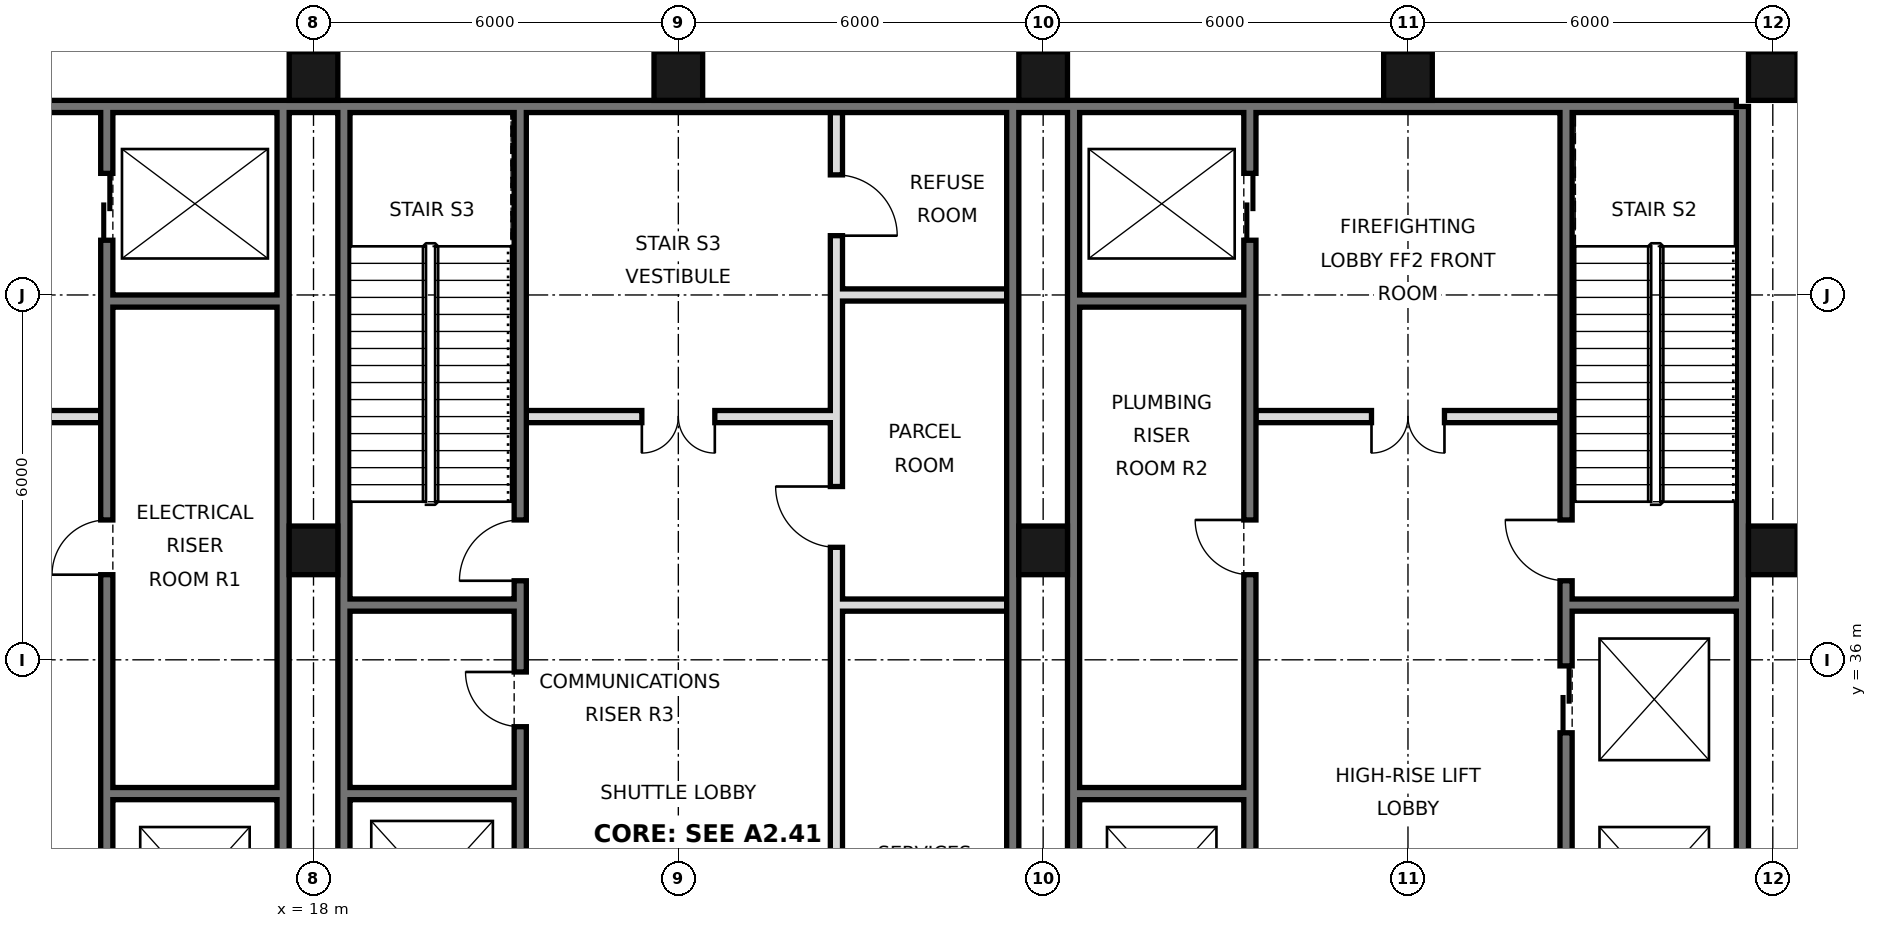
"""IFC4 building model, lengths in metres.
Left out: names, types, materials, properties, quantities, classifications, styles, units other than length and angle.
Written with IfcOpenShell. Run it as: python <this file> out.ifc"""

import sys

from ifc_helpers import new_model, si_unit, direction, frame, frame_2d, origin, origin_2d, place, context, subcontext, project, spatial, rectangle, hollow_rectangle, extrude, element, fill, save


model = new_model("IFC4")
c1 = context("Model", 3, precision=1e-05, world=origin(), true_north=direction((0.0, 1.0)))
c2 = subcontext(c1, "Body", "Model", "MODEL_VIEW")
j1 = project(units=[si_unit("LENGTHUNIT", "METRE"), si_unit("PLANEANGLEUNIT", "RADIAN")], contexts=[c1])
p1 = place(None, origin())
s1 = spatial("IfcSite", under=j1, at=p1, CompositionType="ELEMENT")
p2 = place(p1, origin())
s2 = spatial("IfcBuilding", under=s1, at=p2, CompositionType="ELEMENT")
p3 = place(p2, frame((0.0, 0.0, 161.8)))
s3 = spatial("IfcBuildingStorey", under=s2, at=p3, CompositionType="ELEMENT", Elevation=161.8)
for number, where, z_axis, x_axis in (
    (1, (18.0, 37.8, 0.0), (0.0, 0.0, 1.0), (1.0, 0.0, 0.0)),
    (2, (18.0, 45.6, 0.0), (0.0, 0.0, 1.0), (1.0, 0.0, 0.0)),
    (3, (24.0, 45.6, 0.0), (0.0, 0.0, 1.0), (1.0, 0.0, 0.0)),
    (4, (30.0, 37.8, 0.0), (0.0, 0.0, 1.0), (1.0, 0.0, 0.0)),
    (5, (30.0, 45.6, 0.0), (0.0, 0.0, 1.0), (1.0, 0.0, 0.0)),
    (6, (36.0, 45.6, 0.0), (0.0, 0.0, 1.0), (1.0, 0.0, 0.0)),
    (7, (42.0, 37.8, 0.0), (0.0, 0.0, 1.0), (1.0, 0.0, 0.0)),
    (8, (42.0, 45.6, 0.0), (0.0, 0.0, 1.0), (1.0, 0.0, 0.0)),
):
    element("IfcColumn", number, at=place(p3, frame(where, z_axis=z_axis, x_axis=x_axis)), inside=s3, PredefinedType="COLUMN", context=c2, shape_type="SweptSolid", body=[
        extrude(hollow_rectangle(XDim=0.8, YDim=0.8, WallThickness=0.045, at=origin_2d()), origin(), (0.0, 0.0, 1.0), 5.4),
    ])
p4 = place(p3, frame((41.5, 21.6, 0.0), z_axis=(0.0, 0.0, 1.0), x_axis=(0.0, 1.0, 0.0)))
e9 = element("IfcWall", 9, at=p4, inside=s3, PredefinedType="SOLIDWALL", context=c2, shape_type="SweptSolid", body=[
    extrude(rectangle(XDim=23.5, YDim=0.2, at=frame_2d((11.75, 0.0))), origin(), (0.0, 0.0, 1.0), 5.22),
])
p5 = place(p3, frame((6.6, 45.1, 0.0), z_axis=(0.0, 0.0, 1.0), x_axis=(1.0, 0.0, 0.0)))
e10 = element("IfcWall", 10, at=p5, inside=s3, PredefinedType="SOLIDWALL", context=c2, shape_type="SweptSolid", body=[
    extrude(rectangle(XDim=34.8, YDim=0.2, at=frame_2d((17.4, 0.0))), origin(), (0.0, 0.0, 1.0), 5.22),
])
for number, where, z_axis, x_axis in (
    (11, (17.5, 27.6, 0.0), (0.0, 0.0, 1.0), (0.0, 1.0, 0.0)),
    (12, (18.5, 27.6, 0.0), (0.0, 0.0, 1.0), (0.0, 1.0, 0.0)),
    (13, (29.5, 27.6, 0.0), (0.0, 0.0, 1.0), (0.0, 1.0, 0.0)),
    (14, (30.5, 27.6, 0.0), (0.0, 0.0, 1.0), (0.0, 1.0, 0.0)),
):
    element("IfcWall", number, at=place(p3, frame(where, z_axis=z_axis, x_axis=x_axis)), inside=s3, PredefinedType="SOLIDWALL", context=c2, shape_type="SweptSolid", body=[
        extrude(rectangle(XDim=17.5, YDim=0.2, at=frame_2d((8.75, 0.0))), origin(), (0.0, 0.0, 1.0), 5.22),
    ])
p6 = place(p3, frame((14.6, 27.5, 0.0), z_axis=(0.0, 0.0, 1.0), x_axis=(0.0, 1.0, 0.0)))
e15 = element("IfcWall", 15, at=p6, inside=s3, PredefinedType="SOLIDWALL", context=c2, shape_type="SweptSolid", body=[
    extrude(rectangle(XDim=17.5, YDim=0.2, at=frame_2d((8.75, 0.0))), origin(), (0.0, 0.0, 1.0), 5.22),
])
p7 = place(p6, frame((1.1, 0.0, 0.0)))
e16 = element("IfcOpeningElement", 16, at=p7, cuts=e15, PredefinedType="OPENING", context=c2, shape_type="SweptSolid", body=[
    extrude(rectangle(XDim=1.1, YDim=2.1, at=frame_2d((0.55, 1.05))), frame((0.0, 0.11, 0.0), z_axis=(0.0, -1.0, 0.0), x_axis=(1.0, 0.0, 0.0)), (0.0, 0.0, 1.0), 0.22),
])
p8 = place(p6, frame((4.2, 0.0, 0.0)))
e17 = element("IfcOpeningElement", 17, at=p8, cuts=e15, PredefinedType="OPENING", context=c2, shape_type="SweptSolid", body=[
    extrude(rectangle(XDim=1.1, YDim=2.1, at=frame_2d((0.55, 1.05))), frame((0.0, 0.11, 0.0), z_axis=(0.0, -1.0, 0.0), x_axis=(1.0, 0.0, 0.0)), (0.0, 0.0, 1.0), 0.22),
])
p9 = place(p6, frame((15.4, 0.0, 0.0)))
e18 = element("IfcOpeningElement", 18, at=p9, cuts=e15, PredefinedType="OPENING", context=c2, shape_type="SweptSolid", body=[
    extrude(rectangle(XDim=1.1, YDim=2.1, at=frame_2d((0.55, 1.05))), frame((0.0, 0.11, 0.0), z_axis=(0.0, -1.0, 0.0), x_axis=(1.0, 0.0, 0.0)), (0.0, 0.0, 1.0), 0.22),
])
p10 = place(p6, frame((9.9, 0.0, 0.0)))
e19 = element("IfcOpeningElement", 19, at=p10, cuts=e15, PredefinedType="OPENING", context=c2, shape_type="SweptSolid", body=[
    extrude(rectangle(XDim=0.9, YDim=2.1, at=frame_2d((0.45, 1.05))), frame((0.0, 0.11, 0.0), z_axis=(0.0, -1.0, 0.0), x_axis=(1.0, 0.0, 0.0)), (0.0, 0.0, 1.0), 0.22),
])
p11 = place(p3, frame((21.4, 27.5, 0.0), z_axis=(0.0, 0.0, 1.0), x_axis=(0.0, 1.0, 0.0)))
e20 = element("IfcWall", 20, at=p11, inside=s3, PredefinedType="SOLIDWALL", context=c2, shape_type="SweptSolid", body=[
    extrude(rectangle(XDim=17.5, YDim=0.2, at=frame_2d((8.75, 0.0))), origin(), (0.0, 0.0, 1.0), 5.22),
])
p12 = place(p11, frame((1.1, 0.0, 0.0)))
e21 = element("IfcOpeningElement", 21, at=p12, cuts=e20, PredefinedType="OPENING", context=c2, shape_type="SweptSolid", body=[
    extrude(rectangle(XDim=1.1, YDim=2.1, at=frame_2d((0.55, 1.05))), frame((0.0, 0.11, 0.0), z_axis=(0.0, -1.0, 0.0), x_axis=(1.0, 0.0, 0.0)), (0.0, 0.0, 1.0), 0.22),
])
p13 = place(p11, frame((4.2, 0.0, 0.0)))
e22 = element("IfcOpeningElement", 22, at=p13, cuts=e20, PredefinedType="OPENING", context=c2, shape_type="SweptSolid", body=[
    extrude(rectangle(XDim=1.1, YDim=2.1, at=frame_2d((0.55, 1.05))), frame((0.0, 0.11, 0.0), z_axis=(0.0, -1.0, 0.0), x_axis=(1.0, 0.0, 0.0)), (0.0, 0.0, 1.0), 0.22),
])
p14 = place(p11, frame((9.8, 0.0, 0.0)))
e23 = element("IfcOpeningElement", 23, at=p14, cuts=e20, PredefinedType="OPENING", context=c2, shape_type="SweptSolid", body=[
    extrude(rectangle(XDim=1.0, YDim=2.1, at=frame_2d((0.5, 1.05))), frame((0.0, 0.11, 0.0), z_axis=(0.0, -1.0, 0.0), x_axis=(1.0, 0.0, 0.0)), (0.0, 0.0, 1.0), 0.22),
])
p15 = place(p11, frame((7.4, 0.0, 0.0)))
e24 = element("IfcOpeningElement", 24, at=p15, cuts=e20, PredefinedType="OPENING", context=c2, shape_type="SweptSolid", body=[
    extrude(rectangle(XDim=0.9, YDim=2.1, at=frame_2d((0.45, 1.05))), frame((0.0, 0.11, 0.0), z_axis=(0.0, -1.0, 0.0), x_axis=(1.0, 0.0, 0.0)), (0.0, 0.0, 1.0), 0.22),
])
p16 = place(p3, frame((26.6, 27.5, 0.0), z_axis=(0.0, 0.0, 1.0), x_axis=(0.0, 1.0, 0.0)))
e25 = element("IfcWall", 25, at=p16, inside=s3, PredefinedType="SOLIDWALL", context=c2, shape_type="SweptSolid", body=[
    extrude(rectangle(XDim=17.5, YDim=0.2, at=frame_2d((8.75, 0.0))), origin(), (0.0, 0.0, 1.0), 5.22),
])
p17 = place(p16, frame((4.3, 0.0, 0.0)))
e26 = element("IfcOpeningElement", 26, at=p17, cuts=e25, PredefinedType="OPENING", context=c2, shape_type="SweptSolid", body=[
    extrude(rectangle(XDim=0.9, YDim=2.1, at=frame_2d((0.45, 1.05))), frame((0.0, 0.11, 0.0), z_axis=(0.0, -1.0, 0.0), x_axis=(1.0, 0.0, 0.0)), (0.0, 0.0, 1.0), 0.22),
])
p18 = place(p16, frame((10.35, 0.0, 0.0)))
e27 = element("IfcOpeningElement", 27, at=p18, cuts=e25, PredefinedType="OPENING", context=c2, shape_type="SweptSolid", body=[
    extrude(rectangle(XDim=1.0, YDim=2.1, at=frame_2d((0.5, 1.05))), frame((0.0, 0.11, 0.0), z_axis=(0.0, -1.0, 0.0), x_axis=(1.0, 0.0, 0.0)), (0.0, 0.0, 1.0), 0.22),
])
p19 = place(p16, frame((15.475, 0.0, 0.0)))
e28 = element("IfcOpeningElement", 28, at=p19, cuts=e25, PredefinedType="OPENING", context=c2, shape_type="SweptSolid", body=[
    extrude(rectangle(XDim=1.0, YDim=2.1, at=frame_2d((0.5, 1.05))), frame((0.0, 0.11, 0.0), z_axis=(0.0, -1.0, 0.0), x_axis=(1.0, 0.0, 0.0)), (0.0, 0.0, 1.0), 0.22),
])
p20 = place(p3, frame((33.4, 27.5, 0.0), z_axis=(0.0, 0.0, 1.0), x_axis=(0.0, 1.0, 0.0)))
e29 = element("IfcWall", 29, at=p20, inside=s3, PredefinedType="SOLIDWALL", context=c2, shape_type="SweptSolid", body=[
    extrude(rectangle(XDim=17.5, YDim=0.2, at=frame_2d((8.75, 0.0))), origin(), (0.0, 0.0, 1.0), 5.22),
])
p21 = place(p20, frame((1.1, 0.0, 0.0)))
e30 = element("IfcOpeningElement", 30, at=p21, cuts=e29, PredefinedType="OPENING", context=c2, shape_type="SweptSolid", body=[
    extrude(rectangle(XDim=1.1, YDim=2.1, at=frame_2d((0.55, 1.05))), frame((0.0, 0.11, 0.0), z_axis=(0.0, -1.0, 0.0), x_axis=(1.0, 0.0, 0.0)), (0.0, 0.0, 1.0), 0.22),
])
p22 = place(p20, frame((4.2, 0.0, 0.0)))
e31 = element("IfcOpeningElement", 31, at=p22, cuts=e29, PredefinedType="OPENING", context=c2, shape_type="SweptSolid", body=[
    extrude(rectangle(XDim=1.1, YDim=2.1, at=frame_2d((0.55, 1.05))), frame((0.0, 0.11, 0.0), z_axis=(0.0, -1.0, 0.0), x_axis=(1.0, 0.0, 0.0)), (0.0, 0.0, 1.0), 0.22),
])
p23 = place(p20, frame((15.4, 0.0, 0.0)))
e32 = element("IfcOpeningElement", 32, at=p23, cuts=e29, PredefinedType="OPENING", context=c2, shape_type="SweptSolid", body=[
    extrude(rectangle(XDim=1.1, YDim=2.1, at=frame_2d((0.55, 1.05))), frame((0.0, 0.11, 0.0), z_axis=(0.0, -1.0, 0.0), x_axis=(1.0, 0.0, 0.0)), (0.0, 0.0, 1.0), 0.22),
])
p24 = place(p20, frame((9.9, 0.0, 0.0)))
e33 = element("IfcOpeningElement", 33, at=p24, cuts=e29, PredefinedType="OPENING", context=c2, shape_type="SweptSolid", body=[
    extrude(rectangle(XDim=0.9, YDim=2.1, at=frame_2d((0.45, 1.05))), frame((0.0, 0.11, 0.0), z_axis=(0.0, -1.0, 0.0), x_axis=(1.0, 0.0, 0.0)), (0.0, 0.0, 1.0), 0.22),
])
p25 = place(p3, frame((38.6, 21.6, 0.0), z_axis=(0.0, 0.0, 1.0), x_axis=(0.0, 1.0, 0.0)))
e34 = element("IfcWall", 34, at=p25, inside=s3, PredefinedType="SOLIDWALL", context=c2, shape_type="SweptSolid", body=[
    extrude(rectangle(XDim=23.4, YDim=0.2, at=frame_2d((11.7, 0.0))), origin(), (0.0, 0.0, 1.0), 5.22),
])
p26 = place(p25, frame((7.0, 0.0, 0.0)))
e35 = element("IfcOpeningElement", 35, at=p26, cuts=e34, PredefinedType="OPENING", context=c2, shape_type="SweptSolid", body=[
    extrude(rectangle(XDim=1.1, YDim=2.1, at=frame_2d((0.55, 1.05))), frame((0.0, 0.11, 0.0), z_axis=(0.0, -1.0, 0.0), x_axis=(1.0, 0.0, 0.0)), (0.0, 0.0, 1.0), 0.22),
])
p27 = place(p25, frame((10.1, 0.0, 0.0)))
e36 = element("IfcOpeningElement", 36, at=p27, cuts=e34, PredefinedType="OPENING", context=c2, shape_type="SweptSolid", body=[
    extrude(rectangle(XDim=1.1, YDim=2.1, at=frame_2d((0.55, 1.05))), frame((0.0, 0.11, 0.0), z_axis=(0.0, -1.0, 0.0), x_axis=(1.0, 0.0, 0.0)), (0.0, 0.0, 1.0), 0.22),
])
p28 = place(p25, frame((13.2, 0.0, 0.0)))
e37 = element("IfcOpeningElement", 37, at=p28, cuts=e34, PredefinedType="OPENING", context=c2, shape_type="SweptSolid", body=[
    extrude(rectangle(XDim=1.1, YDim=2.1, at=frame_2d((0.55, 1.05))), frame((0.0, 0.11, 0.0), z_axis=(0.0, -1.0, 0.0), x_axis=(1.0, 0.0, 0.0)), (0.0, 0.0, 1.0), 0.22),
])
p29 = place(p25, frame((15.7, 0.0, 0.0)))
e38 = element("IfcOpeningElement", 38, at=p29, cuts=e34, PredefinedType="OPENING", context=c2, shape_type="SweptSolid", body=[
    extrude(rectangle(XDim=1.0, YDim=2.1, at=frame_2d((0.5, 1.05))), frame((0.0, 0.11, 0.0), z_axis=(0.0, -1.0, 0.0), x_axis=(1.0, 0.0, 0.0)), (0.0, 0.0, 1.0), 0.22),
])
p30 = place(p25, frame((0.175, 0.0, 0.0)))
e39 = element("IfcOpeningElement", 39, at=p30, cuts=e34, PredefinedType="OPENING", context=c2, shape_type="SweptSolid", body=[
    extrude(rectangle(XDim=0.9, YDim=2.1, at=frame_2d((0.45, 1.05))), frame((0.0, 0.11, 0.0), z_axis=(0.0, -1.0, 0.0), x_axis=(1.0, 0.0, 0.0)), (0.0, 0.0, 1.0), 0.22),
])
for number, where, z_axis, x_axis in (
    (40, (14.7, 33.8, 0.0), (0.0, 0.0, 1.0), (1.0, 0.0, 0.0)),
    (41, (18.6, 33.8, 0.0), (0.0, 0.0, 1.0), (1.0, 0.0, 0.0)),
    (42, (30.6, 33.8, 0.0), (0.0, 0.0, 1.0), (1.0, 0.0, 0.0)),
    (43, (18.6, 36.9, 0.0), (0.0, 0.0, 1.0), (1.0, 0.0, 0.0)),
    (44, (26.7, 36.9, 0.0), (0.0, 0.0, 1.0), (1.0, 0.0, 0.0)),
    (45, (38.7, 36.9, 0.0), (0.0, 0.0, 1.0), (1.0, 0.0, 0.0)),
):
    element("IfcWall", number, at=place(p3, frame(where, z_axis=z_axis, x_axis=x_axis)), inside=s3, PredefinedType="SOLIDWALL", context=c2, shape_type="SweptSolid", body=[
        extrude(rectangle(XDim=2.7, YDim=0.2, at=frame_2d((1.35, 0.0))), origin(), (0.0, 0.0, 1.0), 5.22),
    ])
p31 = place(p3, frame((21.5, 40.0, 0.0), z_axis=(0.0, 0.0, 1.0), x_axis=(1.0, 0.0, 0.0)))
e46 = element("IfcWall", 46, at=p31, inside=s3, PredefinedType="PARTITIONING", context=c2, shape_type="SweptSolid", body=[
    extrude(rectangle(XDim=5.0, YDim=0.2, at=frame_2d((2.5, 0.0))), origin(), (0.0, 0.0, 1.0), 5.22),
])
p32 = place(p31, frame((1.9, 0.0, 0.0)))
e47 = element("IfcOpeningElement", 47, at=p32, cuts=e46, PredefinedType="OPENING", context=c2, shape_type="SweptSolid", body=[
    extrude(rectangle(XDim=1.2, YDim=2.1, at=frame_2d((0.6, 1.05))), frame((0.0, 0.11, 0.0), z_axis=(0.0, -1.0, 0.0), x_axis=(1.0, 0.0, 0.0)), (0.0, 0.0, 1.0), 0.22),
])
p33 = place(p3, frame((33.5, 40.0, 0.0), z_axis=(0.0, 0.0, 1.0), x_axis=(1.0, 0.0, 0.0)))
e48 = element("IfcWall", 48, at=p33, inside=s3, PredefinedType="PARTITIONING", context=c2, shape_type="SweptSolid", body=[
    extrude(rectangle(XDim=5.0, YDim=0.2, at=frame_2d((2.5, 0.0))), origin(), (0.0, 0.0, 1.0), 5.22),
])
p34 = place(p33, frame((1.9, 0.0, 0.0)))
e49 = element("IfcOpeningElement", 49, at=p34, cuts=e48, PredefinedType="OPENING", context=c2, shape_type="SweptSolid", body=[
    extrude(rectangle(XDim=1.2, YDim=2.1, at=frame_2d((0.6, 1.05))), frame((0.0, 0.11, 0.0), z_axis=(0.0, -1.0, 0.0), x_axis=(1.0, 0.0, 0.0)), (0.0, 0.0, 1.0), 0.22),
])
p35 = place(p3, frame((9.5, 40.0, 0.0), z_axis=(0.0, 0.0, 1.0), x_axis=(1.0, 0.0, 0.0)))
e50 = element("IfcWall", 50, at=p35, inside=s3, PredefinedType="PARTITIONING", context=c2, shape_type="SweptSolid", body=[
    extrude(rectangle(XDim=5.0, YDim=0.2, at=frame_2d((2.5, 0.0))), origin(), (0.0, 0.0, 1.0), 5.22),
])
p36 = place(p35, frame((1.9, 0.0, 0.0)))
e51 = element("IfcOpeningElement", 51, at=p36, cuts=e50, PredefinedType="OPENING", context=c2, shape_type="SweptSolid", body=[
    extrude(rectangle(XDim=1.2, YDim=2.1, at=frame_2d((0.6, 1.05))), frame((0.0, 0.11, 0.0), z_axis=(0.0, -1.0, 0.0), x_axis=(1.0, 0.0, 0.0)), (0.0, 0.0, 1.0), 0.22),
])
for number, where, z_axis, x_axis in (
    (52, (14.7, 41.9, 0.0), (0.0, 0.0, 1.0), (1.0, 0.0, 0.0)),
    (53, (30.6, 41.9, 0.0), (0.0, 0.0, 1.0), (1.0, 0.0, 0.0)),
):
    element("IfcWall", number, at=place(p3, frame(where, z_axis=z_axis, x_axis=x_axis)), inside=s3, PredefinedType="SOLIDWALL", context=c2, shape_type="SweptSolid", body=[
        extrude(rectangle(XDim=2.7, YDim=0.2, at=frame_2d((1.35, 0.0))), origin(), (0.0, 0.0, 1.0), 5.22),
    ])
p37 = place(p3, frame((26.7, 42.0, 0.0), z_axis=(0.0, 0.0, 1.0), x_axis=(1.0, 0.0, 0.0)))
e54 = element("IfcWall", 54, at=p37, inside=s3, PredefinedType="PARTITIONING", context=c2, shape_type="SweptSolid", body=[
    extrude(rectangle(XDim=2.7, YDim=0.2, at=frame_2d((1.35, 0.0))), origin(), (0.0, 0.0, 1.0), 5.22),
])
p38 = place(p32, frame((1.2, 0.0, 0.0), z_axis=(0.0, 0.0, 1.0), x_axis=(-1.0, 0.0, 0.0)))
e55 = element("IfcDoor", 55, at=p38, inside=s3, OperationType="DOUBLE_DOOR_SINGLE_SWING", PredefinedType="DOOR", context=c2, shape_type="SweptSolid", body=[
    extrude(rectangle(XDim=1.2, YDim=2.1, at=frame_2d((0.6, 1.05))), frame((0.0, 0.025, 0.0), z_axis=(0.0, -1.0, 0.0), x_axis=(1.0, 0.0, 0.0)), (0.0, 0.0, 1.0), 0.05),
])
fill(e47, e55)
p39 = place(p34, frame((1.2, 0.0, 0.0), z_axis=(0.0, 0.0, 1.0), x_axis=(-1.0, 0.0, 0.0)))
e56 = element("IfcDoor", 56, at=p39, inside=s3, OperationType="DOUBLE_DOOR_SINGLE_SWING", PredefinedType="DOOR", context=c2, shape_type="SweptSolid", body=[
    extrude(rectangle(XDim=1.2, YDim=2.1, at=frame_2d((0.6, 1.05))), frame((0.0, 0.025, 0.0), z_axis=(0.0, -1.0, 0.0), x_axis=(1.0, 0.0, 0.0)), (0.0, 0.0, 1.0), 0.05),
])
fill(e49, e56)
p40 = place(p28, origin())
e57 = element("IfcDoor", 57, at=p40, inside=s3, OperationType="DOUBLE_DOOR_SLIDING", PredefinedType="DOOR", context=c2, shape_type="SweptSolid", body=[
    extrude(rectangle(XDim=1.1, YDim=2.1, at=frame_2d((0.55, 1.05))), frame((0.0, 0.025, 0.0), z_axis=(0.0, -1.0, 0.0), x_axis=(1.0, 0.0, 0.0)), (0.0, 0.0, 1.0), 0.05),
])
fill(e37, e57)
p41 = place(p23, origin())
e58 = element("IfcDoor", 58, at=p41, inside=s3, OperationType="DOUBLE_DOOR_SLIDING", PredefinedType="DOOR", context=c2, shape_type="SweptSolid", body=[
    extrude(rectangle(XDim=1.1, YDim=2.1, at=frame_2d((0.55, 1.05))), frame((0.0, 0.025, 0.0), z_axis=(0.0, -1.0, 0.0), x_axis=(1.0, 0.0, 0.0)), (0.0, 0.0, 1.0), 0.05),
])
fill(e32, e58)
p42 = place(p9, origin())
e59 = element("IfcDoor", 59, at=p42, inside=s3, OperationType="DOUBLE_DOOR_SLIDING", PredefinedType="DOOR", context=c2, shape_type="SweptSolid", body=[
    extrude(rectangle(XDim=1.1, YDim=2.1, at=frame_2d((0.55, 1.05))), frame((0.0, 0.025, 0.0), z_axis=(0.0, -1.0, 0.0), x_axis=(1.0, 0.0, 0.0)), (0.0, 0.0, 1.0), 0.05),
])
fill(e18, e59)
p43 = place(p29, frame((1.0, 0.0, 0.0), z_axis=(0.0, 0.0, 1.0), x_axis=(-1.0, 0.0, 0.0)))
e60 = element("IfcDoor", 60, at=p43, inside=s3, OperationType="SINGLE_SWING_LEFT", PredefinedType="DOOR", context=c2, shape_type="SweptSolid", body=[
    extrude(rectangle(XDim=1.0, YDim=2.1, at=frame_2d((0.5, 1.05))), frame((0.0, 0.025, 0.0), z_axis=(0.0, -1.0, 0.0), x_axis=(1.0, 0.0, 0.0)), (0.0, 0.0, 1.0), 0.05),
])
fill(e38, e60)
p44 = place(p14, origin())
e61 = element("IfcDoor", 61, at=p44, inside=s3, OperationType="SINGLE_SWING_LEFT", PredefinedType="DOOR", context=c2, shape_type="SweptSolid", body=[
    extrude(rectangle(XDim=1.0, YDim=2.1, at=frame_2d((0.5, 1.05))), frame((0.0, 0.025, 0.0), z_axis=(0.0, -1.0, 0.0), x_axis=(1.0, 0.0, 0.0)), (0.0, 0.0, 1.0), 0.05),
])
fill(e23, e61)
p45 = place(p10, origin())
e62 = element("IfcDoor", 62, at=p45, inside=s3, OperationType="SINGLE_SWING_LEFT", PredefinedType="DOOR", context=c2, shape_type="SweptSolid", body=[
    extrude(rectangle(XDim=0.9, YDim=2.1, at=frame_2d((0.45, 1.05))), frame((0.0, 0.025, 0.0), z_axis=(0.0, -1.0, 0.0), x_axis=(1.0, 0.0, 0.0)), (0.0, 0.0, 1.0), 0.05),
])
fill(e19, e62)
p46 = place(p24, frame((0.9, 0.0, 0.0), z_axis=(0.0, 0.0, 1.0), x_axis=(-1.0, 0.0, 0.0)))
e63 = element("IfcDoor", 63, at=p46, inside=s3, OperationType="SINGLE_SWING_LEFT", PredefinedType="DOOR", context=c2, shape_type="SweptSolid", body=[
    extrude(rectangle(XDim=0.9, YDim=2.1, at=frame_2d((0.45, 1.05))), frame((0.0, 0.025, 0.0), z_axis=(0.0, -1.0, 0.0), x_axis=(1.0, 0.0, 0.0)), (0.0, 0.0, 1.0), 0.05),
])
fill(e33, e63)
p47 = place(p15, frame((0.9, 0.0, 0.0), z_axis=(0.0, 0.0, 1.0), x_axis=(-1.0, 0.0, 0.0)))
e64 = element("IfcDoor", 64, at=p47, inside=s3, OperationType="SINGLE_SWING_LEFT", PredefinedType="DOOR", context=c2, shape_type="SweptSolid", body=[
    extrude(rectangle(XDim=0.9, YDim=2.1, at=frame_2d((0.45, 1.05))), frame((0.0, 0.025, 0.0), z_axis=(0.0, -1.0, 0.0), x_axis=(1.0, 0.0, 0.0)), (0.0, 0.0, 1.0), 0.05),
])
fill(e24, e64)
p48 = place(p18, frame((1.0, 0.0, 0.0), z_axis=(0.0, 0.0, 1.0), x_axis=(-1.0, 0.0, 0.0)))
e65 = element("IfcDoor", 65, at=p48, inside=s3, OperationType="SINGLE_SWING_LEFT", PredefinedType="DOOR", context=c2, shape_type="SweptSolid", body=[
    extrude(rectangle(XDim=1.0, YDim=2.1, at=frame_2d((0.5, 1.05))), frame((0.0, 0.025, 0.0), z_axis=(0.0, -1.0, 0.0), x_axis=(1.0, 0.0, 0.0)), (0.0, 0.0, 1.0), 0.05),
])
fill(e27, e65)
p49 = place(p19, frame((1.0, 0.0, 0.0), z_axis=(0.0, 0.0, 1.0), x_axis=(-1.0, 0.0, 0.0)))
e66 = element("IfcDoor", 66, at=p49, inside=s3, OperationType="SINGLE_SWING_RIGHT", PredefinedType="DOOR", context=c2, shape_type="SweptSolid", body=[
    extrude(rectangle(XDim=1.0, YDim=2.1, at=frame_2d((0.5, 1.05))), frame((0.0, 0.025, 0.0), z_axis=(0.0, -1.0, 0.0), x_axis=(1.0, 0.0, 0.0)), (0.0, 0.0, 1.0), 0.05),
])
fill(e28, e66)
save(model, sys.argv[1])
